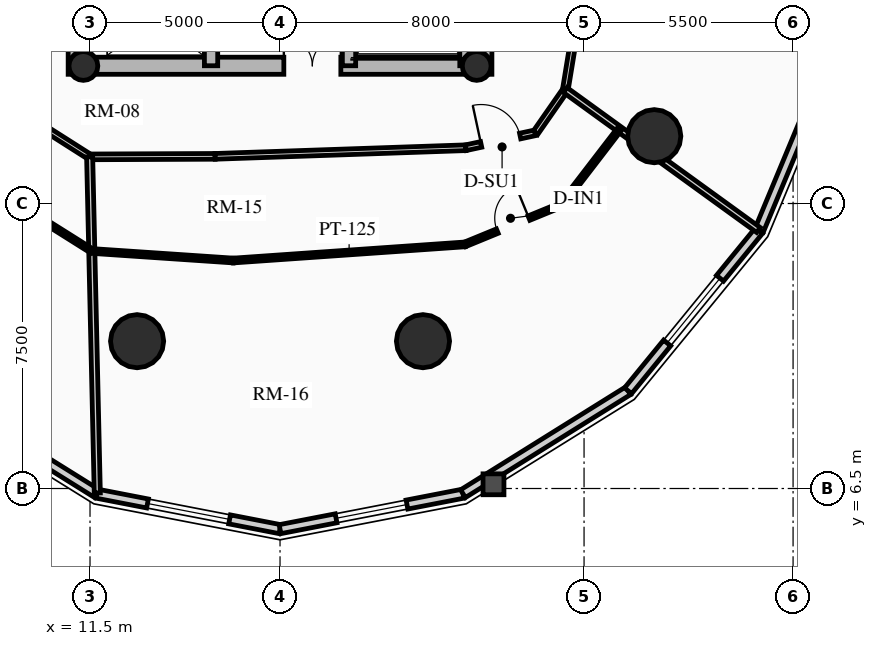
"""IFC4 building model, lengths in metres.
Left out: names, types, materials, properties, quantities, classifications, styles, units other than length and angle.
Written with IfcOpenShell. Run it as: python <this file> out.ifc"""

import sys

from ifc_helpers import new_model, si_unit, direction, frame, frame_2d, origin, origin_2d, place, context, subcontext, project, spatial, rectangle, circle, hollow_circle, extrude, source, transform, mapped, element, fill, save


model = new_model("IFC4")
c1 = context("Model", 3, precision=1e-05, world=origin(), true_north=direction((0.0, 1.0)))
c2 = subcontext(c1, "Body", "Model", "MODEL_VIEW")
j1 = project(units=[si_unit("LENGTHUNIT", "METRE"), si_unit("PLANEANGLEUNIT", "RADIAN")], contexts=[c1])
p1 = place(None, origin())
s1 = spatial("IfcSite", under=j1, at=p1, CompositionType="ELEMENT")
p2 = place(p1, origin())
s2 = spatial("IfcBuilding", under=s1, at=p2, CompositionType="ELEMENT")
p3 = place(p2, frame((0.0, 0.0, 90.52)))
s3 = spatial("IfcBuildingStorey", under=s2, at=p3, CompositionType="ELEMENT", Elevation=90.52)
for number, where, z_axis, x_axis in (
    (1, (11.15, 17.4, 0.0), (0.0, 0.0, 1.0), (0.0, 1.0, 0.0)),
    (2, (21.85, 17.4, 0.0), (0.0, 0.0, 1.0), (0.0, 1.0, 0.0)),
):
    element("IfcWall", number, at=place(p3, frame(where, z_axis=z_axis, x_axis=x_axis)), inside=s3, PredefinedType="SHEAR", context=c2, shape_type="SweptSolid", body=[
        extrude(rectangle(XDim=14.2, YDim=0.45, at=frame_2d((7.1, 0.0))), origin(), (0.0, 0.0, 1.0), 2.91),
    ])
p4 = place(p3, frame((11.15, 17.625, 0.0), z_axis=(0.0, 0.0, 1.0), x_axis=(1.0, 0.0, 0.0)))
e3 = element("IfcWall", 3, at=p4, inside=s3, PredefinedType="SHEAR", context=c2, shape_type="SweptSolid", body=[
    extrude(rectangle(XDim=10.7, YDim=0.45, at=frame_2d((5.35, 0.0))), origin(), (0.0, 0.0, 1.0), 2.91),
])
m1 = source(origin(), c2, "Body", "SweptSolid", [
    extrude(rectangle(XDim=1.5, YDim=2.02, at=frame_2d((0.75, 1.01))), frame((0.0, 0.235, 0.0), z_axis=(0.0, -1.0, 0.0), x_axis=(1.0, 0.0, 0.0)), (0.0, 0.0, 1.0), 0.47),
])
p5 = place(p4, frame((5.45, 0.0, 0.0)))
e4 = element("IfcOpeningElement", 4, at=p5, cuts=e3, PredefinedType="OPENING", context=c2, shape_type="MappedRepresentation", body=[
    mapped(m1, transform((0.0, 0.0, 0.0), x_axis=(1.0, 0.0, 0.0), y_axis=(0.0, 1.0, 0.0), z_axis=(0.0, 0.0, 1.0), scale=1.0)),
])
p6 = place(p3, frame((14.685, 17.625, 0.0), z_axis=(0.0, 0.0, 1.0), x_axis=(0.0, 1.0, 0.0)))
e5 = element("IfcWall", 5, at=p6, inside=s3, PredefinedType="SHEAR", context=c2, shape_type="SweptSolid", body=[
    extrude(rectangle(XDim=13.75, YDim=0.35, at=frame_2d((6.875, 0.0))), origin(), (0.0, 0.0, 1.0), 2.91),
])
m2 = source(origin(), c2, "Body", "SweptSolid", [
    extrude(rectangle(XDim=1.1, YDim=2.015, at=frame_2d((0.55, 1.007))), frame((0.0, 0.185, 0.0), z_axis=(0.0, -1.0, 0.0), x_axis=(1.0, 0.0, 0.0)), (0.0, 0.0, 1.0), 0.37),
])
p7 = place(p6, frame((4.875, 0.0, 0.0)))
e6 = element("IfcOpeningElement", 6, at=p7, cuts=e5, PredefinedType="OPENING", context=c2, shape_type="MappedRepresentation", body=[
    mapped(m2, transform((0.0, 0.0, 0.0), x_axis=(1.0, 0.0, 0.0), y_axis=(0.0, 1.0, 0.0), z_axis=(0.0, 0.0, 1.0), scale=1.0)),
])
m3 = source(origin(), c2, "Body", "SweptSolid", [
    extrude(rectangle(XDim=1.15, YDim=2.02, at=frame_2d((0.575, 1.01))), frame((0.0, 0.185, 0.0), z_axis=(0.0, -1.0, 0.0), x_axis=(1.0, 0.0, 0.0)), (0.0, 0.0, 1.0), 0.37),
])
p8 = place(p6, frame((7.295, 0.0, 0.0)))
e7 = element("IfcOpeningElement", 7, at=p8, cuts=e5, PredefinedType="OPENING", context=c2, shape_type="MappedRepresentation", body=[
    mapped(m3, transform((0.0, 0.0, 0.0), x_axis=(1.0, 0.0, 0.0), y_axis=(0.0, 1.0, 0.0), z_axis=(0.0, 0.0, 1.0), scale=1.0)),
])
p9 = place(p3, frame((18.315, 17.625, 0.0), z_axis=(0.0, 0.0, 1.0), x_axis=(0.0, 1.0, 0.0)))
e8 = element("IfcWall", 8, at=p9, inside=s3, PredefinedType="SHEAR", context=c2, shape_type="SweptSolid", body=[
    extrude(rectangle(XDim=13.75, YDim=0.35, at=frame_2d((6.875, 0.0))), origin(), (0.0, 0.0, 1.0), 2.91),
])
p10 = place(p9, frame((10.0, 0.0, 0.0)))
e9 = element("IfcOpeningElement", 9, at=p10, cuts=e8, PredefinedType="OPENING", context=c2, shape_type="MappedRepresentation", body=[
    mapped(m2, transform((0.0, 0.0, 0.0), x_axis=(1.0, 0.0, 0.0), y_axis=(0.0, 1.0, 0.0), z_axis=(0.0, 0.0, 1.0), scale=1.0)),
])
p11 = place(p9, frame((12.0, 0.0, 0.0)))
e10 = element("IfcOpeningElement", 10, at=p11, cuts=e8, PredefinedType="OPENING", context=c2, shape_type="MappedRepresentation", body=[
    mapped(m2, transform((0.0, 0.0, 0.0), x_axis=(1.0, 0.0, 0.0), y_axis=(0.0, 1.0, 0.0), z_axis=(0.0, 0.0, 1.0), scale=1.0)),
])
p12 = place(p9, frame((5.305, 0.0, 0.0)))
e11 = element("IfcOpeningElement", 11, at=p12, cuts=e8, PredefinedType="OPENING", context=c2, shape_type="MappedRepresentation", body=[
    mapped(m3, transform((0.0, 0.0, 0.0), x_axis=(1.0, 0.0, 0.0), y_axis=(0.0, 1.0, 0.0), z_axis=(0.0, 0.0, 1.0), scale=1.0)),
])
p13 = place(p3, frame((21.405, 17.625, 0.0), z_axis=(0.0, 0.0, 1.0), x_axis=(0.0, 1.0, 0.0)))
e12 = element("IfcWall", 12, at=p13, inside=s3, PredefinedType="SHEAR", context=c2, shape_type="SweptSolid", body=[
    extrude(rectangle(XDim=6.72, YDim=0.35, at=frame_2d((3.36, 0.0))), origin(), (0.0, 0.0, 1.0), 2.91),
])
for number, where, z_axis, x_axis in (
    (13, (11.325, 17.62, 0.0), (0.0, 0.0, 1.0), (1.0, 0.0, 0.0)),
    (14, (21.675, 17.62, 0.0), (0.0, 0.0, 1.0), (1.0, 0.0, 0.0)),
):
    element("IfcColumn", number, at=place(p3, frame(where, z_axis=z_axis, x_axis=x_axis)), inside=s3, PredefinedType="COLUMN", context=c2, shape_type="SweptSolid", body=[
        extrude(hollow_circle(Radius=0.38, WallThickness=0.032, at=origin_2d()), origin(), (0.0, 0.0, 1.0), 2.91),
    ])
for number, where, z_axis, x_axis in (
    (15, (12.739, 10.377, 0.0), (0.0, 0.0, 1.0), (1.0, 0.0, 0.0)),
    (16, (20.261, 10.377, 0.0), (0.0, 0.0, 1.0), (1.0, 0.0, 0.0)),
    (17, (26.347, 15.771, 0.0), (0.0, 0.0, 1.0), (1.0, 0.0, 0.0)),
):
    element("IfcColumn", number, at=place(p3, frame(where, z_axis=z_axis, x_axis=x_axis)), inside=s3, PredefinedType="USERDEFINED", context=c2, shape_type="SweptSolid", body=[
        extrude(circle(Radius=0.7, at=origin_2d()), origin(), (0.0, 0.0, 1.0), 2.91),
    ])
p14 = place(p3, frame((11.685, 6.363, 0.0), z_axis=(0.0, 0.0, 1.0), x_axis=(-0.848520380187, 0.529162701263, 0.0)))
e18 = element("IfcWall", 18, at=p14, inside=s3, PredefinedType="SOLIDWALL", context=c2, shape_type="SweptSolid", body=[
    extrude(rectangle(XDim=5.119, YDim=0.24, at=frame_2d((2.56, 0.0))), origin(), (0.0, 0.0, 1.0), 2.179),
])
m4 = source(origin(), c2, "Body", "SweptSolid", [
    extrude(rectangle(XDim=1.9, YDim=1.35, at=frame_2d((0.95, 0.675))), frame((0.0, 0.13, 0.0), z_axis=(0.0, -1.0, 0.0), x_axis=(1.0, 0.0, 0.0)), (0.0, 0.0, 1.0), 0.26),
])
p15 = place(p14, frame((1.609, 0.0, 0.65)))
e19 = element("IfcOpeningElement", 19, at=p15, cuts=e18, PredefinedType="OPENING", context=c2, shape_type="MappedRepresentation", body=[
    mapped(m4, transform((0.0, 0.0, 0.0), x_axis=(1.0, 0.0, 0.0), y_axis=(0.0, 1.0, 0.0), z_axis=(0.0, 0.0, 1.0), scale=1.0)),
])
p16 = place(p3, frame((16.5, 5.43, 0.0), z_axis=(0.0, 0.0, 1.0), x_axis=(-0.981723785992, 0.190311344954, 0.0)))
e20 = element("IfcWall", 20, at=p16, inside=s3, PredefinedType="SOLIDWALL", context=c2, shape_type="SweptSolid", body=[
    extrude(rectangle(XDim=4.904, YDim=0.24, at=frame_2d((2.452, 0.0))), origin(), (0.0, 0.0, 1.0), 2.179),
])
m5 = source(origin(), c2, "Body", "SweptSolid", [
    extrude(rectangle(XDim=2.2, YDim=1.35, at=frame_2d((1.1, 0.675))), frame((0.0, 0.13, 0.0), z_axis=(0.0, -1.0, 0.0), x_axis=(1.0, 0.0, 0.0)), (0.0, 0.0, 1.0), 0.26),
])
p17 = place(p16, frame((1.352, 0.0, 0.65)))
e21 = element("IfcOpeningElement", 21, at=p17, cuts=e20, PredefinedType="OPENING", context=c2, shape_type="MappedRepresentation", body=[
    mapped(m5, transform((0.0, 0.0, 0.0), x_axis=(1.0, 0.0, 0.0), y_axis=(0.0, 1.0, 0.0), z_axis=(0.0, 0.0, 1.0), scale=1.0)),
])
p18 = place(p3, frame((21.315, 6.363, 0.0), z_axis=(0.0, 0.0, 1.0), x_axis=(-0.981723785992, -0.190311344954, 0.0)))
e22 = element("IfcWall", 22, at=p18, inside=s3, PredefinedType="SOLIDWALL", context=c2, shape_type="SweptSolid", body=[
    extrude(rectangle(XDim=4.904, YDim=0.24, at=frame_2d((2.452, 0.0))), origin(), (0.0, 0.0, 1.0), 2.179),
])
p19 = place(p18, frame((1.502, 0.0, 0.65)))
e23 = element("IfcOpeningElement", 23, at=p19, cuts=e22, PredefinedType="OPENING", context=c2, shape_type="MappedRepresentation", body=[
    mapped(m4, transform((0.0, 0.0, 0.0), x_axis=(1.0, 0.0, 0.0), y_axis=(0.0, 1.0, 0.0), z_axis=(0.0, 0.0, 1.0), scale=1.0)),
])
p20 = place(p3, frame((25.658, 9.072, 0.0), z_axis=(0.0, 0.0, 1.0), x_axis=(-0.848520380187, -0.529162701263, 0.0)))
e24 = element("IfcWall", 24, at=p20, inside=s3, PredefinedType="SOLIDWALL", context=c2, shape_type="SweptSolid", body=[
    extrude(rectangle(XDim=5.119, YDim=0.24, at=frame_2d((2.56, 0.0))), origin(), (0.0, 0.0, 1.0), 2.179),
])
p21 = place(p3, frame((29.105, 13.291, 0.0), z_axis=(0.0, 0.0, 1.0), x_axis=(-0.632700781152, -0.77439635945, 0.0)))
e25 = element("IfcWall", 25, at=p21, inside=s3, PredefinedType="SOLIDWALL", context=c2, shape_type="SweptSolid", body=[
    extrude(rectangle(XDim=5.448, YDim=0.24, at=frame_2d((2.724, 0.0))), origin(), (0.0, 0.0, 1.0), 2.179),
])
p22 = place(p21, frame((1.624, 0.0, 0.65)))
e26 = element("IfcOpeningElement", 26, at=p22, cuts=e25, PredefinedType="OPENING", context=c2, shape_type="MappedRepresentation", body=[
    mapped(m5, transform((0.0, 0.0, 0.0), x_axis=(1.0, 0.0, 0.0), y_axis=(0.0, 1.0, 0.0), z_axis=(0.0, 0.0, 1.0), scale=1.0)),
])
p23 = place(p3, frame((31.318, 18.607, 0.0), z_axis=(0.0, 0.0, 1.0), x_axis=(-0.384344417632, -0.923189779317, 0.0)))
e27 = element("IfcWall", 27, at=p23, inside=s3, PredefinedType="SOLIDWALL", context=c2, shape_type="SweptSolid", body=[
    extrude(rectangle(XDim=5.758, YDim=0.24, at=frame_2d((2.879, 0.0))), origin(), (0.0, 0.0, 1.0), 2.179),
])
p24 = place(p3, frame((10.156, 16.075, 0.0), z_axis=(0.0, 0.0, 1.0), x_axis=(0.843896624713, -0.536505812455, 0.0)))
e28 = element("IfcWall", 28, at=p24, inside=s3, PredefinedType="PARTITIONING", context=c2, shape_type="SweptSolid", body=[
    extrude(rectangle(XDim=1.581, YDim=0.15, at=frame_2d((0.791, 0.0))), origin(), (0.0, 0.0, 1.0), 2.225),
])
p25 = place(p3, frame((11.49, 15.227, 0.0), z_axis=(0.0, 0.0, 1.0), x_axis=(0.999991728046, 0.004067411998, 0.0)))
e29 = element("IfcWall", 29, at=p25, inside=s3, PredefinedType="PARTITIONING", context=c2, shape_type="SweptSolid", body=[
    extrude(rectangle(XDim=3.301, YDim=0.15, at=frame_2d((1.651, 0.0))), origin(), (0.0, 0.0, 1.0), 2.225),
])
p26 = place(p3, frame((14.792, 15.24, 0.0), z_axis=(0.0, 0.0, 1.0), x_axis=(0.999408106202, 0.034401122909, 0.0)))
e30 = element("IfcWall", 30, at=p26, inside=s3, PredefinedType="PARTITIONING", context=c2, shape_type="SweptSolid", body=[
    extrude(rectangle(XDim=6.6, YDim=0.15, at=frame_2d((3.3, 0.0))), origin(), (0.0, 0.0, 1.0), 2.225),
])
p27 = place(p3, frame((21.388, 15.468, 0.0), z_axis=(0.0, 0.0, 1.0), x_axis=(0.977672748596, 0.210133283069, 0.0)))
e31 = element("IfcWall", 31, at=p27, inside=s3, PredefinedType="PARTITIONING", context=c2, shape_type="SweptSolid", body=[
    extrude(rectangle(XDim=1.876, YDim=0.15, at=frame_2d((0.938, 0.0))), origin(), (0.0, 0.0, 1.0), 2.225),
])
m6 = source(origin(), c2, "Body", "SweptSolid", [
    extrude(rectangle(XDim=1.05, YDim=2.015, at=frame_2d((0.525, 1.007))), frame((0.0, 0.085, 0.0), z_axis=(0.0, -1.0, 0.0), x_axis=(1.0, 0.0, 0.0)), (0.0, 0.0, 1.0), 0.17),
])
p28 = place(p27, frame((0.413, 0.0, 0.0)))
e32 = element("IfcOpeningElement", 32, at=p28, cuts=e31, PredefinedType="OPENING", context=c2, shape_type="MappedRepresentation", body=[
    mapped(m6, transform((0.0, 0.0, 0.0), x_axis=(1.0, 0.0, 0.0), y_axis=(0.0, 1.0, 0.0), z_axis=(0.0, 0.0, 1.0), scale=1.0)),
])
p29 = place(p3, frame((23.222, 15.862, 0.0), z_axis=(0.0, 0.0, 1.0), x_axis=(0.571941738195, 0.820294244836, 0.0)))
e33 = element("IfcWall", 33, at=p29, inside=s3, PredefinedType="PARTITIONING", context=c2, shape_type="SweptSolid", body=[
    extrude(rectangle(XDim=1.369, YDim=0.15, at=frame_2d((0.685, 0.0))), origin(), (0.0, 0.0, 1.0), 2.225),
])
p30 = place(p3, frame((24.006, 16.985, 0.0), z_axis=(0.0, 0.0, 1.0), x_axis=(0.162043475877, 0.986783619608, 0.0)))
e34 = element("IfcWall", 34, at=p30, inside=s3, PredefinedType="PARTITIONING", context=c2, shape_type="SweptSolid", body=[
    extrude(rectangle(XDim=1.597, YDim=0.15, at=frame_2d((0.798, 0.0))), origin(), (0.0, 0.0, 1.0), 2.225),
])
p31 = place(p3, frame((11.49, 15.227, 0.0), z_axis=(0.0, 0.0, 1.0), x_axis=(0.022711375682, -0.999742063442, 0.0)))
e35 = element("IfcWall", 35, at=p31, inside=s3, PredefinedType="PARTITIONING", context=c2, shape_type="SweptSolid", body=[
    extrude(rectangle(XDim=8.847, YDim=0.16, at=frame_2d((4.423, 0.0))), origin(), (0.0, 0.0, 1.0), 2.179),
])
p32 = place(p3, frame((24.006, 16.985, 0.0), z_axis=(0.0, 0.0, 1.0), x_axis=(0.809849730791, -0.586637378231, 0.0)))
e36 = element("IfcWall", 36, at=p32, inside=s3, PredefinedType="PARTITIONING", context=c2, shape_type="SweptSolid", body=[
    extrude(rectangle(XDim=6.277, YDim=0.16, at=frame_2d((3.139, 0.0))), origin(), (0.0, 0.0, 1.0), 2.179),
])
p33 = place(p3, frame((9.371, 14.119, 0.0), z_axis=(0.0, 0.0, 1.0), x_axis=(0.846446940893, -0.532473075613, 0.0)))
e37 = element("IfcWall", 37, at=p33, inside=s3, PredefinedType="PARTITIONING", context=c2, shape_type="SweptSolid", body=[
    extrude(rectangle(XDim=2.57, YDim=0.125, at=frame_2d((1.285, 0.0))), origin(), (0.0, 0.0, 1.0), 2.225),
])
p34 = place(p3, frame((11.547, 12.75, 0.0), z_axis=(0.0, 0.0, 1.0), x_axis=(0.997731575096, -0.067317932645, 0.0)))
e38 = element("IfcWall", 38, at=p34, inside=s3, PredefinedType="PARTITIONING", context=c2, shape_type="SweptSolid", body=[
    extrude(rectangle(XDim=3.732, YDim=0.125, at=frame_2d((1.866, 0.0))), origin(), (0.0, 0.0, 1.0), 2.225),
])
p35 = place(p3, frame((15.27, 12.499, 0.0), z_axis=(0.0, 0.0, 1.0), x_axis=(0.997586055533, 0.069441067147, 0.0)))
e39 = element("IfcWall", 39, at=p35, inside=s3, PredefinedType="PARTITIONING", context=c2, shape_type="SweptSolid", body=[
    extrude(rectangle(XDim=6.11, YDim=0.125, at=frame_2d((3.055, 0.0))), origin(), (0.0, 0.0, 1.0), 2.225),
])
p36 = place(p3, frame((21.366, 12.924, 0.0), z_axis=(0.0, 0.0, 1.0), x_axis=(0.924996898971, 0.379974652962, 0.0)))
e40 = element("IfcWall", 40, at=p36, inside=s3, PredefinedType="PARTITIONING", context=c2, shape_type="SweptSolid", body=[
    extrude(rectangle(XDim=2.741, YDim=0.125, at=frame_2d((1.371, 0.0))), origin(), (0.0, 0.0, 1.0), 2.225),
])
m7 = source(origin(), c2, "Body", "SweptSolid", [
    extrude(rectangle(XDim=0.9, YDim=2.005, at=frame_2d((0.45, 1.002))), frame((0.0, 0.073, 0.0), z_axis=(0.0, -1.0, 0.0), x_axis=(1.0, 0.0, 0.0)), (0.0, 0.0, 1.0), 0.145),
])
p37 = place(p36, frame((0.92, 0.0, 0.0)))
e41 = element("IfcOpeningElement", 41, at=p37, cuts=e40, PredefinedType="OPENING", context=c2, shape_type="MappedRepresentation", body=[
    mapped(m7, transform((0.0, 0.0, 0.0), x_axis=(1.0, 0.0, 0.0), y_axis=(0.0, 1.0, 0.0), z_axis=(0.0, 0.0, 1.0), scale=1.0)),
])
p38 = place(p3, frame((23.901, 13.965, 0.0), z_axis=(0.0, 0.0, 1.0), x_axis=(0.609164923344, 0.793043565113, 0.0)))
e42 = element("IfcWall", 42, at=p38, inside=s3, PredefinedType="PARTITIONING", context=c2, shape_type="SweptSolid", body=[
    extrude(rectangle(XDim=2.508, YDim=0.125, at=frame_2d((1.254, 0.0))), origin(), (0.0, 0.0, 1.0), 2.655),
])
m8 = source(origin(), c2, "Body", "SweptSolid", [
    extrude(rectangle(XDim=2.2, YDim=1.35, at=frame_2d((1.1, 0.675))), frame((0.0, 0.03, 0.0), z_axis=(0.0, -1.0, 0.0), x_axis=(1.0, 0.0, 0.0)), (0.0, 0.0, 1.0), 0.06),
])
p39 = place(p17, origin())
e43 = element("IfcWindow", 43, at=p39, inside=s3, PartitioningType="DOUBLE_PANEL_VERTICAL", PredefinedType="WINDOW", context=c2, shape_type="MappedRepresentation", body=[
    mapped(m8, transform((0.0, 0.0, 0.0), x_axis=(1.0, 0.0, 0.0), y_axis=(0.0, 1.0, 0.0), z_axis=(0.0, 0.0, 1.0), scale=1.0)),
])
fill(e21, e43)
m9 = source(origin(), c2, "Body", "SweptSolid", [
    extrude(rectangle(XDim=1.9, YDim=1.35, at=frame_2d((0.95, 0.675))), frame((0.0, 0.03, 0.0), z_axis=(0.0, -1.0, 0.0), x_axis=(1.0, 0.0, 0.0)), (0.0, 0.0, 1.0), 0.06),
])
p40 = place(p19, origin())
e44 = element("IfcWindow", 44, at=p40, inside=s3, PartitioningType="DOUBLE_PANEL_VERTICAL", PredefinedType="WINDOW", context=c2, shape_type="MappedRepresentation", body=[
    mapped(m9, transform((0.0, 0.0, 0.0), x_axis=(1.0, 0.0, 0.0), y_axis=(0.0, 1.0, 0.0), z_axis=(0.0, 0.0, 1.0), scale=1.0)),
])
fill(e23, e44)
p41 = place(p22, origin())
e45 = element("IfcWindow", 45, at=p41, inside=s3, PartitioningType="DOUBLE_PANEL_VERTICAL", PredefinedType="WINDOW", context=c2, shape_type="MappedRepresentation", body=[
    mapped(m8, transform((0.0, 0.0, 0.0), x_axis=(1.0, 0.0, 0.0), y_axis=(0.0, 1.0, 0.0), z_axis=(0.0, 0.0, 1.0), scale=1.0)),
])
fill(e26, e45)
m10 = source(origin(), c2, "Body", "SweptSolid", [
    extrude(rectangle(XDim=1.5, YDim=2.02, at=frame_2d((0.75, 1.01))), frame((0.0, 0.025, 0.0), z_axis=(0.0, -1.0, 0.0), x_axis=(1.0, 0.0, 0.0)), (0.0, 0.0, 1.0), 0.05),
])
p42 = place(p5, origin())
e46 = element("IfcDoor", 46, at=p42, inside=s3, OperationType="DOUBLE_DOOR_SINGLE_SWING", PredefinedType="DOOR", context=c2, shape_type="MappedRepresentation", body=[
    mapped(m10, transform((0.0, 0.0, 0.0), x_axis=(1.0, 0.0, 0.0), y_axis=(0.0, 1.0, 0.0), z_axis=(0.0, 0.0, 1.0), scale=1.0)),
])
fill(e4, e46)
m11 = source(origin(), c2, "Body", "SweptSolid", [
    extrude(rectangle(XDim=1.05, YDim=2.015, at=frame_2d((0.525, 1.007))), frame((0.0, 0.025, 0.0), z_axis=(0.0, -1.0, 0.0), x_axis=(1.0, 0.0, 0.0)), (0.0, 0.0, 1.0), 0.05),
])
p43 = place(p28, origin())
e47 = element("IfcDoor", 47, at=p43, inside=s3, OperationType="SINGLE_SWING_LEFT", PredefinedType="DOOR", context=c2, shape_type="MappedRepresentation", body=[
    mapped(m11, transform((0.0, 0.0, 0.0), x_axis=(1.0, 0.0, 0.0), y_axis=(0.0, 1.0, 0.0), z_axis=(0.0, 0.0, 1.0), scale=1.0)),
])
fill(e32, e47)
m12 = source(origin(), c2, "Body", "SweptSolid", [
    extrude(rectangle(XDim=0.9, YDim=2.005, at=frame_2d((0.45, 1.002))), frame((0.0, 0.025, 0.0), z_axis=(0.0, -1.0, 0.0), x_axis=(1.0, 0.0, 0.0)), (0.0, 0.0, 1.0), 0.05),
])
p44 = place(p37, origin())
e48 = element("IfcDoor", 48, at=p44, inside=s3, OperationType="SINGLE_SWING_RIGHT", PredefinedType="DOOR", context=c2, shape_type="MappedRepresentation", body=[
    mapped(m12, transform((0.0, 0.0, 0.0), x_axis=(1.0, 0.0, 0.0), y_axis=(0.0, 1.0, 0.0), z_axis=(0.0, 0.0, 1.0), scale=1.0)),
])
fill(e41, e48)
save(model, sys.argv[1])
